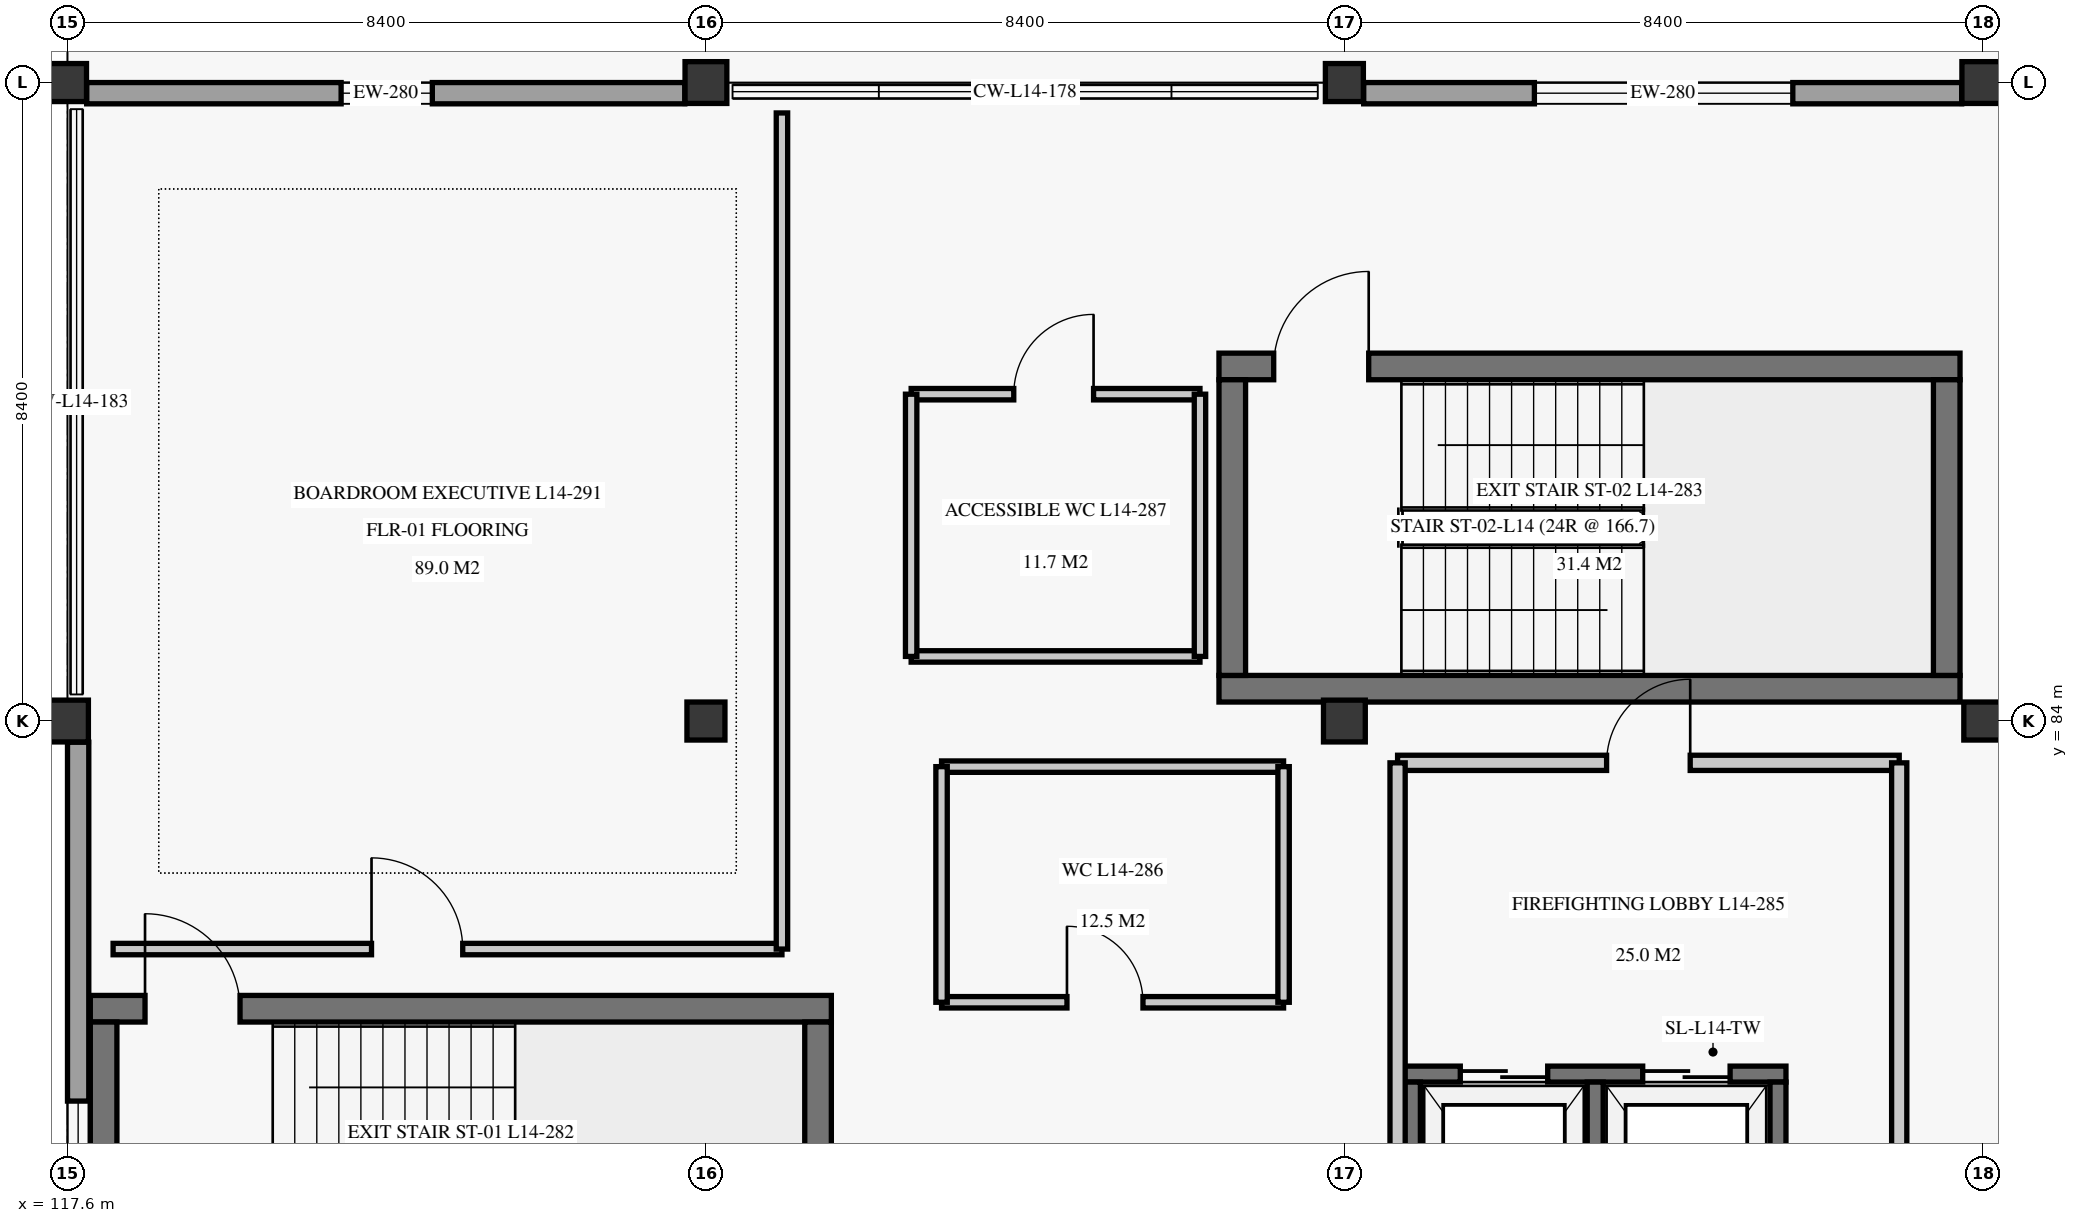
"""IFC4 building model, lengths in metres.
Left out: names, types, materials, properties, quantities, classifications, styles, units other than length and angle.
Written with IfcOpenShell. Run it as: python <this file> out.ifc"""

import sys

from ifc_helpers import new_model, si_unit, direction, frame, frame_2d, origin, origin_2d, place, context, subcontext, project, spatial, rectangle, extrude, element, fill, save


model = new_model("IFC4")
c1 = context("Model", 3, precision=1e-05, world=origin(), true_north=direction((0.0, 1.0)))
c2 = subcontext(c1, "Body", "Model", "MODEL_VIEW")
j1 = project(units=[si_unit("LENGTHUNIT", "METRE"), si_unit("PLANEANGLEUNIT", "RADIAN")], contexts=[c1])
p1 = place(None, origin())
s1 = spatial("IfcSite", under=j1, at=p1, CompositionType="ELEMENT")
p2 = place(p1, origin())
s2 = spatial("IfcBuilding", under=s1, at=p2, CompositionType="ELEMENT")
p3 = place(p2, frame((0.0, 0.0, 58.7)))
s3 = spatial("IfcBuildingStorey", under=s2, at=p3, CompositionType="ELEMENT", Elevation=58.7)
p4 = place(p3, frame((117.6, 84.0, 0.0), z_axis=(0.0, 0.0, 1.0), x_axis=(1.0, 0.0, 0.0)))
e1 = element("IfcColumn", 1, at=p4, inside=s3, PredefinedType="COLUMN", context=c2, shape_type="SweptSolid", body=[
    extrude(rectangle(XDim=0.55, YDim=0.55, at=origin_2d()), origin(), (0.0, 0.0, 1.0), 3.72),
])
for number, where, z_axis, x_axis in (
    (2, (117.6, 92.4, 0.0), (0.0, 0.0, 1.0), (1.0, 0.0, 0.0)),
    (3, (126.0, 84.0, 0.0), (0.0, 0.0, 1.0), (1.0, 0.0, 0.0)),
):
    element("IfcColumn", number, at=place(p3, frame(where, z_axis=z_axis, x_axis=x_axis)), inside=s3, PredefinedType="COLUMN", context=c2, shape_type="SweptSolid", body=[
        extrude(rectangle(XDim=0.5, YDim=0.5, at=origin_2d()), origin(), (0.0, 0.0, 1.0), 3.72),
    ])
for number, where, z_axis, x_axis in (
    (4, (126.0, 92.4, 0.0), (0.0, 0.0, 1.0), (1.0, 0.0, 0.0)),
    (5, (134.4, 84.0, 0.0), (0.0, 0.0, 1.0), (1.0, 0.0, 0.0)),
):
    element("IfcColumn", number, at=place(p3, frame(where, z_axis=z_axis, x_axis=x_axis)), inside=s3, PredefinedType="COLUMN", context=c2, shape_type="SweptSolid", body=[
        extrude(rectangle(XDim=0.55, YDim=0.55, at=origin_2d()), origin(), (0.0, 0.0, 1.0), 3.72),
    ])
for number, where, z_axis, x_axis in (
    (6, (134.4, 92.4, 0.0), (0.0, 0.0, 1.0), (1.0, 0.0, 0.0)),
    (7, (142.8, 84.0, 0.0), (0.0, 0.0, 1.0), (1.0, 0.0, 0.0)),
):
    element("IfcColumn", number, at=place(p3, frame(where, z_axis=z_axis, x_axis=x_axis)), inside=s3, PredefinedType="COLUMN", context=c2, shape_type="SweptSolid", body=[
        extrude(rectangle(XDim=0.5, YDim=0.5, at=origin_2d()), origin(), (0.0, 0.0, 1.0), 3.72),
    ])
p5 = place(p3, frame((142.8, 92.4, 0.0), z_axis=(0.0, 0.0, 1.0), x_axis=(1.0, 0.0, 0.0)))
e8 = element("IfcColumn", 8, at=p5, inside=s3, PredefinedType="COLUMN", context=c2, shape_type="SweptSolid", body=[
    extrude(rectangle(XDim=0.55, YDim=0.55, at=origin_2d()), origin(), (0.0, 0.0, 1.0), 3.72),
])
p6 = place(p3, frame((117.852, 92.26, 0.0), z_axis=(0.0, 0.0, 1.0), x_axis=(1.0, 0.0, 0.0)))
e9 = element("IfcWall", 9, at=p6, inside=s3, PredefinedType="SOLIDWALL", context=c2, shape_type="SweptSolid", body=[
    extrude(rectangle(XDim=7.87, YDim=0.28, at=frame_2d((3.935, 0.0))), origin(), (0.0, 0.0, 1.0), 3.04),
])
p7 = place(p6, frame((3.348, 0.0, 0.85)))
e10 = element("IfcOpeningElement", 10, at=p7, cuts=e9, PredefinedType="OPENING", context=c2, shape_type="SweptSolid", body=[
    extrude(rectangle(XDim=1.2, YDim=1.6, at=frame_2d((0.6, 0.8))), frame((0.0, 0.15, 0.0), z_axis=(0.0, -1.0, 0.0), x_axis=(1.0, 0.0, 0.0)), (0.0, 0.0, 1.0), 0.3),
])
p8 = place(p3, frame((134.654, 92.26, 0.0), z_axis=(0.0, 0.0, 1.0), x_axis=(1.0, 0.0, 0.0)))
e11 = element("IfcWall", 11, at=p8, inside=s3, PredefinedType="SOLIDWALL", context=c2, shape_type="SweptSolid", body=[
    extrude(rectangle(XDim=7.868, YDim=0.28, at=frame_2d((3.934, 0.0))), origin(), (0.0, 0.0, 1.0), 3.04),
])
p9 = place(p8, frame((2.246, 0.0, 0.85)))
e12 = element("IfcOpeningElement", 12, at=p9, cuts=e11, PredefinedType="OPENING", context=c2, shape_type="SweptSolid", body=[
    extrude(rectangle(XDim=3.4, YDim=1.9, at=frame_2d((1.7, 0.95))), frame((0.0, 0.15, 0.0), z_axis=(0.0, -1.0, 0.0), x_axis=(1.0, 0.0, 0.0)), (0.0, 0.0, 1.0), 0.3),
])
p10 = place(p3, frame((117.74, 75.852, 0.0), z_axis=(0.0, 0.0, 1.0), x_axis=(0.0, 1.0, 0.0)))
e13 = element("IfcWall", 13, at=p10, inside=s3, PredefinedType="SOLIDWALL", context=c2, shape_type="SweptSolid", body=[
    extrude(rectangle(XDim=7.87, YDim=0.28, at=frame_2d((3.935, 0.0))), origin(), (0.0, 0.0, 1.0), 3.04),
])
p11 = place(p10, frame((0.948, 0.0, 0.85)))
e14 = element("IfcOpeningElement", 14, at=p11, cuts=e13, PredefinedType="OPENING", context=c2, shape_type="SweptSolid", body=[
    extrude(rectangle(XDim=2.2, YDim=1.8, at=frame_2d((1.1, 0.9))), frame((0.0, 0.15, 0.0), z_axis=(0.0, -1.0, 0.0), x_axis=(1.0, 0.0, 0.0)), (0.0, 0.0, 1.0), 0.3),
])
p12 = place(p3, frame((117.9, 80.215, 0.0), z_axis=(0.0, 0.0, 1.0), x_axis=(1.0, 0.0, 0.0)))
e15 = element("IfcWall", 15, at=p12, inside=s3, PredefinedType="SHEAR", context=c2, shape_type="SweptSolid", body=[
    extrude(rectangle(XDim=9.75, YDim=0.35, at=frame_2d((4.875, 0.0))), origin(), (0.0, 0.0, 1.0), 3.72),
])
p13 = place(p12, frame((0.72, 0.0, 0.0)))
e16 = element("IfcOpeningElement", 16, at=p13, cuts=e15, PredefinedType="OPENING", context=c2, shape_type="SweptSolid", body=[
    extrude(rectangle(XDim=1.25, YDim=2.2, at=frame_2d((0.625, 1.1))), frame((0.0, 0.185, 0.0), z_axis=(0.0, -1.0, 0.0), x_axis=(1.0, 0.0, 0.0)), (0.0, 0.0, 1.0), 0.37),
])
for number, where, z_axis, x_axis in (
    (17, (118.075, 76.15, 0.0), (0.0, 0.0, 1.0), (0.0, 1.0, 0.0)),
    (18, (127.475, 76.15, 0.0), (0.0, 0.0, 1.0), (0.0, 1.0, 0.0)),
):
    element("IfcWall", number, at=place(p3, frame(where, z_axis=z_axis, x_axis=x_axis)), inside=s3, PredefinedType="SHEAR", context=c2, shape_type="SweptSolid", body=[
        extrude(rectangle(XDim=3.89, YDim=0.35, at=frame_2d((1.945, 0.0))), origin(), (0.0, 0.0, 1.0), 3.72),
    ])
p14 = place(p3, frame((132.75, 84.425, 0.0), z_axis=(0.0, 0.0, 1.0), x_axis=(1.0, 0.0, 0.0)))
e19 = element("IfcWall", 19, at=p14, inside=s3, PredefinedType="SHEAR", context=c2, shape_type="SweptSolid", body=[
    extrude(rectangle(XDim=9.75, YDim=0.35, at=frame_2d((4.875, 0.0))), origin(), (0.0, 0.0, 1.0), 3.72),
])
p15 = place(p3, frame((132.75, 88.665, 0.0), z_axis=(0.0, 0.0, 1.0), x_axis=(1.0, 0.0, 0.0)))
e20 = element("IfcWall", 20, at=p15, inside=s3, PredefinedType="SHEAR", context=c2, shape_type="SweptSolid", body=[
    extrude(rectangle(XDim=9.75, YDim=0.35, at=frame_2d((4.875, 0.0))), origin(), (0.0, 0.0, 1.0), 3.72),
])
p16 = place(p15, frame((0.72, 0.0, 0.0)))
e21 = element("IfcOpeningElement", 21, at=p16, cuts=e20, PredefinedType="OPENING", context=c2, shape_type="SweptSolid", body=[
    extrude(rectangle(XDim=1.25, YDim=2.2, at=frame_2d((0.625, 1.1))), frame((0.0, 0.185, 0.0), z_axis=(0.0, -1.0, 0.0), x_axis=(1.0, 0.0, 0.0)), (0.0, 0.0, 1.0), 0.37),
])
for number, where, z_axis, x_axis in (
    (22, (132.925, 84.6, 0.0), (0.0, 0.0, 1.0), (0.0, 1.0, 0.0)),
    (23, (142.325, 84.6, 0.0), (0.0, 0.0, 1.0), (0.0, 1.0, 0.0)),
):
    element("IfcWall", number, at=place(p3, frame(where, z_axis=z_axis, x_axis=x_axis)), inside=s3, PredefinedType="SHEAR", context=c2, shape_type="SweptSolid", body=[
        extrude(rectangle(XDim=3.89, YDim=0.35, at=frame_2d((1.945, 0.0))), origin(), (0.0, 0.0, 1.0), 3.72),
    ])
p17 = place(p3, frame((135.19, 79.355, 0.0), z_axis=(0.0, 0.0, 1.0), x_axis=(1.0, 0.0, 0.0)))
e24 = element("IfcWall", 24, at=p17, inside=s3, PredefinedType="SHEAR", context=c2, shape_type="SweptSolid", body=[
    extrude(rectangle(XDim=5.02, YDim=0.21, at=frame_2d((2.51, 0.0))), origin(), (0.0, 0.0, 1.0), 3.72),
])
p18 = place(p17, frame((0.735, 0.0, 0.0)))
e25 = element("IfcOpeningElement", 25, at=p18, cuts=e24, PredefinedType="OPENING", context=c2, shape_type="SweptSolid", body=[
    extrude(rectangle(XDim=1.15, YDim=2.2, at=frame_2d((0.575, 1.1))), frame((0.0, 0.115, 0.0), z_axis=(0.0, -1.0, 0.0), x_axis=(1.0, 0.0, 0.0)), (0.0, 0.0, 1.0), 0.23),
])
p19 = place(p17, frame((3.135, 0.0, 0.0)))
e26 = element("IfcOpeningElement", 26, at=p19, cuts=e24, PredefinedType="OPENING", context=c2, shape_type="SweptSolid", body=[
    extrude(rectangle(XDim=1.15, YDim=2.2, at=frame_2d((0.575, 1.1))), frame((0.0, 0.115, 0.0), z_axis=(0.0, -1.0, 0.0), x_axis=(1.0, 0.0, 0.0)), (0.0, 0.0, 1.0), 0.23),
])
for number, where, z_axis, x_axis in (
    (27, (135.295, 76.25, 0.0), (0.0, 0.0, 1.0), (0.0, 1.0, 0.0)),
    (28, (140.105, 76.25, 0.0), (0.0, 0.0, 1.0), (0.0, 1.0, 0.0)),
    (29, (137.7, 76.25, 0.0), (0.0, 0.0, 1.0), (0.0, 1.0, 0.0)),
):
    element("IfcWall", number, at=place(p3, frame(where, z_axis=z_axis, x_axis=x_axis)), inside=s3, PredefinedType="SHEAR", context=c2, shape_type="SweptSolid", body=[
        extrude(rectangle(XDim=3.0, YDim=0.21, at=frame_2d((1.5, 0.0))), origin(), (0.0, 0.0, 1.0), 3.72),
    ])
p20 = place(p3, frame((135.1, 83.45, 0.0), z_axis=(0.0, 0.0, 1.0), x_axis=(1.0, 0.0, 0.0)))
e30 = element("IfcWall", 30, at=p20, inside=s3, PredefinedType="PARTITIONING", context=c2, shape_type="SweptSolid", body=[
    extrude(rectangle(XDim=6.6, YDim=0.2, at=frame_2d((3.3, 0.0))), origin(), (0.0, 0.0, 1.0), 3.34),
])
p21 = place(p20, frame((2.75, 0.0, 0.0)))
e31 = element("IfcOpeningElement", 31, at=p21, cuts=e30, PredefinedType="OPENING", context=c2, shape_type="SweptSolid", body=[
    extrude(rectangle(XDim=1.1, YDim=2.2, at=frame_2d((0.55, 1.1))), frame((0.0, 0.11, 0.0), z_axis=(0.0, -1.0, 0.0), x_axis=(1.0, 0.0, 0.0)), (0.0, 0.0, 1.0), 0.22),
])
for number, where, z_axis, x_axis in (
    (32, (135.1, 76.2, 0.0), (0.0, 0.0, 1.0), (0.0, 1.0, 0.0)),
    (33, (141.7, 76.2, 0.0), (0.0, 0.0, 1.0), (0.0, 1.0, 0.0)),
):
    element("IfcWall", number, at=place(p3, frame(where, z_axis=z_axis, x_axis=x_axis)), inside=s3, PredefinedType="PARTITIONING", context=c2, shape_type="SweptSolid", body=[
        extrude(rectangle(XDim=7.25, YDim=0.2, at=frame_2d((3.625, 0.0))), origin(), (0.0, 0.0, 1.0), 3.34),
    ])
p22 = place(p3, frame((129.1, 80.3, 0.0), z_axis=(0.0, 0.0, 1.0), x_axis=(1.0, 0.0, 0.0)))
e34 = element("IfcWall", 34, at=p22, inside=s3, PredefinedType="PARTITIONING", context=c2, shape_type="SweptSolid", body=[
    extrude(rectangle(XDim=4.5, YDim=0.15, at=frame_2d((2.25, 0.0))), origin(), (0.0, 0.0, 1.0), 3.34),
])
p23 = place(p22, frame((1.65, 0.0, 0.0)))
e35 = element("IfcOpeningElement", 35, at=p23, cuts=e34, PredefinedType="OPENING", context=c2, shape_type="SweptSolid", body=[
    extrude(rectangle(XDim=1.0, YDim=2.1, at=frame_2d((0.5, 1.05))), frame((0.0, 0.085, 0.0), z_axis=(0.0, -1.0, 0.0), x_axis=(1.0, 0.0, 0.0)), (0.0, 0.0, 1.0), 0.17),
])
p24 = place(p3, frame((129.1, 83.4, 0.0), z_axis=(0.0, 0.0, 1.0), x_axis=(1.0, 0.0, 0.0)))
e36 = element("IfcWall", 36, at=p24, inside=s3, PredefinedType="PARTITIONING", context=c2, shape_type="SweptSolid", body=[
    extrude(rectangle(XDim=4.5, YDim=0.15, at=frame_2d((2.25, 0.0))), origin(), (0.0, 0.0, 1.0), 3.34),
])
for number, where, z_axis, x_axis in (
    (37, (129.1, 80.3, 0.0), (0.0, 0.0, 1.0), (0.0, 1.0, 0.0)),
    (38, (133.6, 80.3, 0.0), (0.0, 0.0, 1.0), (0.0, 1.0, 0.0)),
):
    element("IfcWall", number, at=place(p3, frame(where, z_axis=z_axis, x_axis=x_axis)), inside=s3, PredefinedType="PARTITIONING", context=c2, shape_type="SweptSolid", body=[
        extrude(rectangle(XDim=3.1, YDim=0.15, at=frame_2d((1.55, 0.0))), origin(), (0.0, 0.0, 1.0), 3.34),
    ])
p25 = place(p3, frame((128.7, 88.3, 0.0), z_axis=(0.0, 0.0, 1.0), x_axis=(1.0, 0.0, 0.0)))
e39 = element("IfcWall", 39, at=p25, inside=s3, PredefinedType="PARTITIONING", context=c2, shape_type="SweptSolid", body=[
    extrude(rectangle(XDim=3.8, YDim=0.15, at=frame_2d((1.9, 0.0))), origin(), (0.0, 0.0, 1.0), 3.34),
])
p26 = place(p25, frame((1.35, 0.0, 0.0)))
e40 = element("IfcOpeningElement", 40, at=p26, cuts=e39, PredefinedType="OPENING", context=c2, shape_type="SweptSolid", body=[
    extrude(rectangle(XDim=1.05, YDim=2.15, at=frame_2d((0.525, 1.075))), frame((0.0, 0.085, 0.0), z_axis=(0.0, -1.0, 0.0), x_axis=(1.0, 0.0, 0.0)), (0.0, 0.0, 1.0), 0.17),
])
p27 = place(p3, frame((128.7, 84.85, 0.0), z_axis=(0.0, 0.0, 1.0), x_axis=(1.0, 0.0, 0.0)))
e41 = element("IfcWall", 41, at=p27, inside=s3, PredefinedType="PARTITIONING", context=c2, shape_type="SweptSolid", body=[
    extrude(rectangle(XDim=3.8, YDim=0.15, at=frame_2d((1.9, 0.0))), origin(), (0.0, 0.0, 1.0), 3.34),
])
for number, where, z_axis, x_axis in (
    (42, (128.7, 84.85, 0.0), (0.0, 0.0, 1.0), (0.0, 1.0, 0.0)),
    (43, (132.5, 84.85, 0.0), (0.0, 0.0, 1.0), (0.0, 1.0, 0.0)),
):
    element("IfcWall", number, at=place(p3, frame(where, z_axis=z_axis, x_axis=x_axis)), inside=s3, PredefinedType="PARTITIONING", context=c2, shape_type="SweptSolid", body=[
        extrude(rectangle(XDim=3.45, YDim=0.15, at=frame_2d((1.725, 0.0))), origin(), (0.0, 0.0, 1.0), 3.34),
    ])
p28 = place(p3, frame((118.2, 81.0, 0.0), z_axis=(0.0, 0.0, 1.0), x_axis=(1.0, 0.0, 0.0)))
e44 = element("IfcWall", 44, at=p28, inside=s3, PredefinedType="PARTITIONING", context=c2, shape_type="SweptSolid", body=[
    extrude(rectangle(XDim=8.8, YDim=0.15, at=frame_2d((4.4, 0.0))), origin(), (0.0, 0.0, 1.0), 3.34),
])
p29 = place(p28, frame((3.4, 0.0, 0.0)))
e45 = element("IfcOpeningElement", 45, at=p29, cuts=e44, PredefinedType="OPENING", context=c2, shape_type="SweptSolid", body=[
    extrude(rectangle(XDim=1.2, YDim=2.3, at=frame_2d((0.6, 1.15))), frame((0.0, 0.085, 0.0), z_axis=(0.0, -1.0, 0.0), x_axis=(1.0, 0.0, 0.0)), (0.0, 0.0, 1.0), 0.17),
])
p30 = place(p3, frame((127.0, 81.0, 0.0), z_axis=(0.0, 0.0, 1.0), x_axis=(0.0, 1.0, 0.0)))
e46 = element("IfcWall", 46, at=p30, inside=s3, PredefinedType="PARTITIONING", context=c2, shape_type="SweptSolid", body=[
    extrude(rectangle(XDim=11.0, YDim=0.15, at=frame_2d((5.5, 0.0))), origin(), (0.0, 0.0, 1.0), 3.34),
])
p31 = place(p7, origin())
e47 = element("IfcWindow", 47, at=p31, inside=s3, PartitioningType="SINGLE_PANEL", PredefinedType="WINDOW", context=c2, shape_type="SweptSolid", body=[
    extrude(rectangle(XDim=1.2, YDim=1.6, at=frame_2d((0.6, 0.8))), frame((0.0, 0.03, 0.0), z_axis=(0.0, -1.0, 0.0), x_axis=(1.0, 0.0, 0.0)), (0.0, 0.0, 1.0), 0.06),
])
fill(e10, e47)
p32 = place(p9, origin())
e48 = element("IfcWindow", 48, at=p32, inside=s3, PartitioningType="SINGLE_PANEL", PredefinedType="WINDOW", context=c2, shape_type="SweptSolid", body=[
    extrude(rectangle(XDim=3.4, YDim=1.9, at=frame_2d((1.7, 0.95))), frame((0.0, 0.03, 0.0), z_axis=(0.0, -1.0, 0.0), x_axis=(1.0, 0.0, 0.0)), (0.0, 0.0, 1.0), 0.06),
])
fill(e12, e48)
p33 = place(p11, origin())
e49 = element("IfcWindow", 49, at=p33, inside=s3, PartitioningType="SINGLE_PANEL", PredefinedType="WINDOW", context=c2, shape_type="SweptSolid", body=[
    extrude(rectangle(XDim=2.2, YDim=1.8, at=frame_2d((1.1, 0.9))), frame((0.0, 0.03, 0.0), z_axis=(0.0, -1.0, 0.0), x_axis=(1.0, 0.0, 0.0)), (0.0, 0.0, 1.0), 0.06),
])
fill(e14, e49)
p34 = place(p13, origin())
e50 = element("IfcDoor", 50, at=p34, inside=s3, OperationType="SINGLE_SWING_LEFT", PredefinedType="DOOR", context=c2, shape_type="SweptSolid", body=[
    extrude(rectangle(XDim=1.25, YDim=2.2, at=frame_2d((0.625, 1.1))), frame((0.0, 0.025, 0.0), z_axis=(0.0, -1.0, 0.0), x_axis=(1.0, 0.0, 0.0)), (0.0, 0.0, 1.0), 0.05),
])
fill(e16, e50)
p35 = place(p16, origin())
e51 = element("IfcDoor", 51, at=p35, inside=s3, OperationType="SINGLE_SWING_RIGHT", PredefinedType="DOOR", context=c2, shape_type="SweptSolid", body=[
    extrude(rectangle(XDim=1.25, YDim=2.2, at=frame_2d((0.625, 1.1))), frame((0.0, 0.025, 0.0), z_axis=(0.0, -1.0, 0.0), x_axis=(1.0, 0.0, 0.0)), (0.0, 0.0, 1.0), 0.05),
])
fill(e21, e51)
p36 = place(p18, origin())
e52 = element("IfcDoor", 52, at=p36, inside=s3, OperationType="DOUBLE_DOOR_SLIDING", PredefinedType="DOOR", context=c2, shape_type="SweptSolid", body=[
    extrude(rectangle(XDim=1.15, YDim=2.2, at=frame_2d((0.575, 1.1))), frame((0.0, 0.025, 0.0), z_axis=(0.0, -1.0, 0.0), x_axis=(1.0, 0.0, 0.0)), (0.0, 0.0, 1.0), 0.05),
])
fill(e25, e52)
p37 = place(p19, origin())
e53 = element("IfcDoor", 53, at=p37, inside=s3, OperationType="DOUBLE_DOOR_SLIDING", PredefinedType="DOOR", context=c2, shape_type="SweptSolid", body=[
    extrude(rectangle(XDim=1.15, YDim=2.2, at=frame_2d((0.575, 1.1))), frame((0.0, 0.025, 0.0), z_axis=(0.0, -1.0, 0.0), x_axis=(1.0, 0.0, 0.0)), (0.0, 0.0, 1.0), 0.05),
])
fill(e26, e53)
p38 = place(p21, origin())
e54 = element("IfcDoor", 54, at=p38, inside=s3, OperationType="SINGLE_SWING_RIGHT", PredefinedType="DOOR", context=c2, shape_type="SweptSolid", body=[
    extrude(rectangle(XDim=1.1, YDim=2.2, at=frame_2d((0.55, 1.1))), frame((0.0, 0.025, 0.0), z_axis=(0.0, -1.0, 0.0), x_axis=(1.0, 0.0, 0.0)), (0.0, 0.0, 1.0), 0.05),
])
fill(e31, e54)
p39 = place(p23, origin())
e55 = element("IfcDoor", 55, at=p39, inside=s3, OperationType="SINGLE_SWING_LEFT", PredefinedType="DOOR", context=c2, shape_type="SweptSolid", body=[
    extrude(rectangle(XDim=1.0, YDim=2.1, at=frame_2d((0.5, 1.05))), frame((0.0, 0.025, 0.0), z_axis=(0.0, -1.0, 0.0), x_axis=(1.0, 0.0, 0.0)), (0.0, 0.0, 1.0), 0.05),
])
fill(e35, e55)
p40 = place(p26, origin())
e56 = element("IfcDoor", 56, at=p40, inside=s3, OperationType="SINGLE_SWING_RIGHT", PredefinedType="DOOR", context=c2, shape_type="SweptSolid", body=[
    extrude(rectangle(XDim=1.05, YDim=2.15, at=frame_2d((0.525, 1.075))), frame((0.0, 0.025, 0.0), z_axis=(0.0, -1.0, 0.0), x_axis=(1.0, 0.0, 0.0)), (0.0, 0.0, 1.0), 0.05),
])
fill(e40, e56)
p41 = place(p29, origin())
e57 = element("IfcDoor", 57, at=p41, inside=s3, OperationType="SINGLE_SWING_LEFT", PredefinedType="DOOR", context=c2, shape_type="SweptSolid", body=[
    extrude(rectangle(XDim=1.2, YDim=2.3, at=frame_2d((0.6, 1.15))), frame((0.0, 0.025, 0.0), z_axis=(0.0, -1.0, 0.0), x_axis=(1.0, 0.0, 0.0)), (0.0, 0.0, 1.0), 0.05),
])
fill(e45, e57)
save(model, sys.argv[1])
